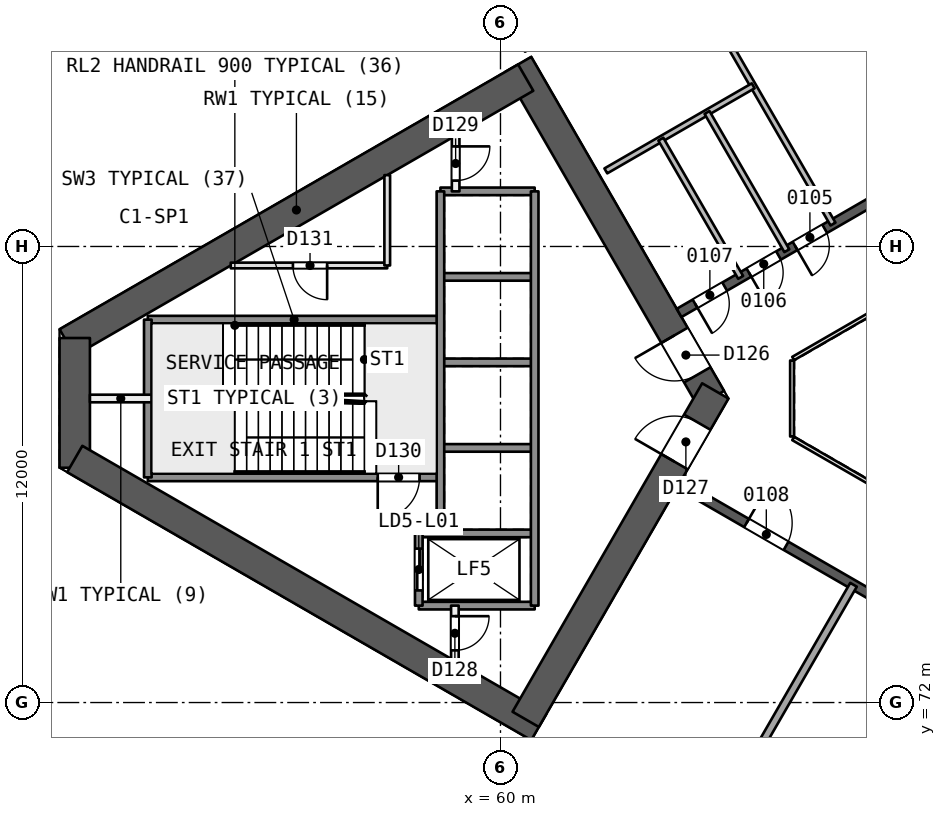
"""IFC4 building model, lengths in metres.
Left out: names, types, materials, properties, quantities, classifications, styles, units other than length and angle.
Written with IfcOpenShell. Run it as: python <this file> out.ifc"""

import sys

from ifc_helpers import new_model, si_unit, direction, frame, frame_2d, origin, place, context, subcontext, project, spatial, rectangle, extrude, element, fill, save


model = new_model("IFC4")
c1 = context("Model", 3, precision=1e-05, world=origin(), true_north=direction((0.0, 1.0)))
c2 = subcontext(c1, "Body", "Model", "MODEL_VIEW")
j1 = project(units=[si_unit("LENGTHUNIT", "METRE"), si_unit("PLANEANGLEUNIT", "RADIAN")], contexts=[c1])
p1 = place(None, origin())
s1 = spatial("IfcSite", under=j1, at=p1, CompositionType="ELEMENT")
p2 = place(p1, origin())
s2 = spatial("IfcBuilding", under=s1, at=p2, CompositionType="ELEMENT")
p3 = place(p2, frame((0.0, 0.0, 9.0)))
s3 = spatial("IfcBuildingStorey", under=s2, at=p3, CompositionType="ELEMENT", Elevation=9.0)
p4 = place(p3, frame((65.538, 80.0, 0.0), z_axis=(0.0, 0.0, 1.0), x_axis=(-0.49999662545, 0.866027352073, 0.0)))
e1 = element("IfcWall", 1, at=p4, inside=s3, PredefinedType="SHEAR", context=c2, shape_type="SweptSolid", body=[
    extrude(rectangle(XDim=10.149, YDim=0.8, at=frame_2d((5.074, 0.0))), origin(), (0.0, 0.0, 1.0), 6.0),
])
p5 = place(p4, frame((0.719, 0.0, 0.0)))
e2 = element("IfcOpeningElement", 2, at=p5, cuts=e1, PredefinedType="OPENING", context=c2, shape_type="SweptSolid", body=[
    extrude(rectangle(XDim=1.2, YDim=2.1, at=frame_2d((0.6, 1.05))), frame((0.0, 0.411, 0.0), z_axis=(0.0, -1.0, 0.0), x_axis=(1.0, 0.0, 0.0)), (0.0, 0.0, 1.0), 0.821),
])
p6 = place(p3, frame((60.664, 88.443, 0.0), z_axis=(0.0, 0.0, 1.0), x_axis=(-0.866029478545, -0.499992942241, 0.0)))
e3 = element("IfcWall", 3, at=p6, inside=s3, PredefinedType="SHEAR", context=c2, shape_type="SweptSolid", body=[
    extrude(rectangle(XDim=13.933, YDim=0.8, at=frame_2d((6.967, 0.0))), origin(), (0.0, 0.0, 1.0), 6.0),
])
p7 = place(p3, frame((48.797, 81.592, 0.0), z_axis=(0.0, 0.0, 1.0), x_axis=(0.0, -1.0, 0.0)))
e4 = element("IfcWall", 4, at=p7, inside=s3, PredefinedType="SHEAR", context=c2, shape_type="SweptSolid", body=[
    extrude(rectangle(XDim=3.415, YDim=0.8, at=frame_2d((1.707, 0.0))), origin(), (0.0, 0.0, 1.0), 6.0),
])
p8 = place(p3, frame((48.797, 78.408, 0.0), z_axis=(0.0, 0.0, 1.0), x_axis=(0.866032504327, -0.499987701298, 0.0)))
e5 = element("IfcWall", 5, at=p8, inside=s3, PredefinedType="SHEAR", context=c2, shape_type="SweptSolid", body=[
    extrude(rectangle(XDim=14.102, YDim=0.8, at=frame_2d((7.051, 0.0))), origin(), (0.0, 0.0, 1.0), 6.0),
])
p9 = place(p3, frame((60.664, 71.557, 0.0), z_axis=(0.0, 0.0, 1.0), x_axis=(0.50000409368, 0.866023040284, 0.0)))
e6 = element("IfcWall", 6, at=p9, inside=s3, PredefinedType="SHEAR", context=c2, shape_type="SweptSolid", body=[
    extrude(rectangle(XDim=9.98, YDim=0.8, at=frame_2d((4.99, 0.0))), origin(), (0.0, 0.0, 1.0), 6.0),
])
p10 = place(p9, frame((7.83, 0.0, 0.0)))
e7 = element("IfcOpeningElement", 7, at=p10, cuts=e6, PredefinedType="OPENING", context=c2, shape_type="SweptSolid", body=[
    extrude(rectangle(XDim=1.2, YDim=2.1, at=frame_2d((0.6, 1.05))), frame((0.0, 0.411, 0.0), z_axis=(0.0, -1.0, 0.0), x_axis=(1.0, 0.0, 0.0)), (0.0, 0.0, 1.0), 0.821),
])
p11 = place(p3, frame((78.2, 90.046, 0.0), z_axis=(0.0, 0.0, 1.0), x_axis=(-0.866026492143, -0.499998114903, 0.0)))
e8 = element("IfcWall", 8, at=p11, inside=s3, PredefinedType="SHEAR", context=c2, shape_type="SweptSolid", body=[
    extrude(rectangle(XDim=15.588, YDim=0.25, at=frame_2d((7.794, 0.0))), origin(), (0.0, 0.0, 1.0), 5.6),
])
p12 = place(p11, frame((4.856, 0.0, 0.0)))
e9 = element("IfcOpeningElement", 9, at=p12, cuts=e8, PredefinedType="OPENING", context=c2, shape_type="SweptSolid", body=[
    extrude(rectangle(XDim=1.2, YDim=2.4, at=frame_2d((0.6, 1.2))), frame((0.0, 0.135, 0.0), z_axis=(0.0, -1.0, 0.0), x_axis=(1.0, 0.0, 0.0)), (0.0, 0.0, 1.0), 0.271),
])
p13 = place(p11, frame((11.163, 0.0, 0.0)))
e10 = element("IfcOpeningElement", 10, at=p13, cuts=e8, PredefinedType="OPENING", context=c2, shape_type="SweptSolid", body=[
    extrude(rectangle(XDim=0.9, YDim=2.1, at=frame_2d((0.45, 1.05))), frame((0.0, 0.135, 0.0), z_axis=(0.0, -1.0, 0.0), x_axis=(1.0, 0.0, 0.0)), (0.0, 0.0, 1.0), 0.271),
])
p14 = place(p11, frame((12.566, 0.0, 0.0)))
e11 = element("IfcOpeningElement", 11, at=p14, cuts=e8, PredefinedType="OPENING", context=c2, shape_type="SweptSolid", body=[
    extrude(rectangle(XDim=0.9, YDim=2.1, at=frame_2d((0.45, 1.05))), frame((0.0, 0.135, 0.0), z_axis=(0.0, -1.0, 0.0), x_axis=(1.0, 0.0, 0.0)), (0.0, 0.0, 1.0), 0.271),
])
p15 = place(p11, frame((14.203, 0.0, 0.0)))
e12 = element("IfcOpeningElement", 12, at=p15, cuts=e8, PredefinedType="OPENING", context=c2, shape_type="SweptSolid", body=[
    extrude(rectangle(XDim=0.9, YDim=2.1, at=frame_2d((0.45, 1.05))), frame((0.0, 0.135, 0.0), z_axis=(0.0, -1.0, 0.0), x_axis=(1.0, 0.0, 0.0)), (0.0, 0.0, 1.0), 0.271),
])
p16 = place(p3, frame((64.7, 77.748, 0.0), z_axis=(0.0, 0.0, 1.0), x_axis=(0.866026492143, -0.499998114903, 0.0)))
e13 = element("IfcWall", 13, at=p16, inside=s3, PredefinedType="SHEAR", context=c2, shape_type="SweptSolid", body=[
    extrude(rectangle(XDim=15.588, YDim=0.25, at=frame_2d((7.794, 0.0))), origin(), (0.0, 0.0, 1.0), 5.6),
])
p17 = place(p16, frame((2.05, 0.0, 0.0)))
e14 = element("IfcOpeningElement", 14, at=p17, cuts=e13, PredefinedType="OPENING", context=c2, shape_type="SweptSolid", body=[
    extrude(rectangle(XDim=1.2, YDim=2.4, at=frame_2d((0.6, 1.2))), frame((0.0, 0.135, 0.0), z_axis=(0.0, -1.0, 0.0), x_axis=(1.0, 0.0, 0.0)), (0.0, 0.0, 1.0), 0.271),
])
p18 = place(p16, frame((7.272, 0.0, 0.0)))
e15 = element("IfcOpeningElement", 15, at=p18, cuts=e13, PredefinedType="OPENING", context=c2, shape_type="SweptSolid", body=[
    extrude(rectangle(XDim=1.2, YDim=2.4, at=frame_2d((0.6, 1.2))), frame((0.0, 0.135, 0.0), z_axis=(0.0, -1.0, 0.0), x_axis=(1.0, 0.0, 0.0)), (0.0, 0.0, 1.0), 0.271),
])
p19 = place(p16, frame((12.417, 0.0, 0.0)))
e16 = element("IfcOpeningElement", 16, at=p19, cuts=e13, PredefinedType="OPENING", context=c2, shape_type="SweptSolid", body=[
    extrude(rectangle(XDim=1.2, YDim=2.4, at=frame_2d((0.6, 1.2))), frame((0.0, 0.135, 0.0), z_axis=(0.0, -1.0, 0.0), x_axis=(1.0, 0.0, 0.0)), (0.0, 0.0, 1.0), 0.271),
])
p20 = place(p3, frame((62.117, 96.081, 0.0), z_axis=(0.0, 0.0, 1.0), x_axis=(0.49992899291, -0.866066395866, 0.0)))
e17 = element("IfcWall", 17, at=p20, inside=s3, PredefinedType="PARTITIONING", context=c2, shape_type="SweptSolid", body=[
    extrude(rectangle(XDim=13.268, YDim=0.15, at=frame_2d((6.634, 0.0))), origin(), (0.0, 0.0, 1.0), 5.6),
])
p21 = place(p20, frame((6.184, 0.0, 0.0)))
e18 = element("IfcOpeningElement", 18, at=p21, cuts=e17, PredefinedType="OPENING", context=c2, shape_type="SweptSolid", body=[
    extrude(rectangle(XDim=0.9, YDim=2.1, at=frame_2d((0.45, 1.05))), frame((0.0, 0.085, 0.0), z_axis=(0.0, -1.0, 0.0), x_axis=(1.0, 0.0, 0.0)), (0.0, 0.0, 1.0), 0.171),
])
p22 = place(p3, frame((62.772, 85.989, 0.0), z_axis=(0.0, 0.0, 1.0), x_axis=(0.866013054227, 0.500021389451, 0.0)))
e19 = element("IfcWall", 19, at=p22, inside=s3, PredefinedType="PARTITIONING", context=c2, shape_type="SweptSolid", body=[
    extrude(rectangle(XDim=4.477, YDim=0.15, at=frame_2d((2.239, 0.0))), origin(), (0.0, 0.0, 1.0), 5.6),
])
for number, where, z_axis, x_axis in (
    (20, (65.435, 87.526, 0.0), (0.0, 0.0, 1.0), (0.5, -0.866, 0.0)),
    (21, (64.22, 86.824, 0.0), (0.0, 0.0, 1.0), (0.5, -0.866, 0.0)),
):
    element("IfcWall", number, at=place(p3, frame(where, z_axis=z_axis, x_axis=x_axis)), inside=s3, PredefinedType="PARTITIONING", context=c2, shape_type="SweptSolid", body=[
        extrude(rectangle(XDim=4.2, YDim=0.15, at=frame_2d((2.1, 0.0))), origin(), (0.0, 0.0, 1.0), 5.6),
    ])
p23 = place(p3, frame((58.617, 56.612, 0.0), z_axis=(0.0, 0.0, 1.0), x_axis=(0.500000322675, 0.866025217488, 0.0)))
e22 = element("IfcWall", 22, at=p23, inside=s3, PredefinedType="PARTITIONING", context=c2, shape_type="SweptSolid", body=[
    extrude(rectangle(XDim=21.346, YDim=0.2, at=frame_2d((10.673, 0.0))), origin(), (0.0, 0.0, 1.0), 5.6),
])
p24 = place(p3, frame((63.072, 54.04, 0.0), z_axis=(0.0, 0.0, 1.0), x_axis=(0.500005275173, 0.86602235814, 0.0)))
e23 = element("IfcWall", 23, at=p24, inside=s3, PredefinedType="PARTITIONING", context=c2, shape_type="SweptSolid", body=[
    extrude(rectangle(XDim=21.346, YDim=0.2, at=frame_2d((10.673, 0.0))), origin(), (0.0, 0.0, 1.0), 5.6),
])
p25 = place(p3, frame((60.9, 85.45, 0.0), z_axis=(0.0, 0.0, 1.0), x_axis=(-1.0, 0.0, 0.0)))
e24 = element("IfcWall", 24, at=p25, inside=s3, PredefinedType="SOLIDWALL", context=c2, shape_type="SweptSolid", body=[
    extrude(rectangle(XDim=2.48, YDim=0.2, at=frame_2d((1.24, 0.0))), origin(), (0.0, 0.0, 1.0), 5.6),
])
p26 = place(p3, frame((57.02, 83.5, 0.0), z_axis=(0.0, 0.0, 1.0), x_axis=(-1.0, 0.0, 0.0)))
e25 = element("IfcWall", 25, at=p26, inside=s3, PredefinedType="PARTITIONING", context=c2, shape_type="SweptSolid", body=[
    extrude(rectangle(XDim=4.118, YDim=0.15, at=frame_2d((2.059, 0.0))), origin(), (0.0, 0.0, 1.0), 5.6),
])
p27 = place(p26, frame((1.582, 0.0, 0.0)))
e26 = element("IfcOpeningElement", 26, at=p27, cuts=e25, PredefinedType="OPENING", context=c2, shape_type="SweptSolid", body=[
    extrude(rectangle(XDim=0.9, YDim=2.1, at=frame_2d((0.45, 1.05))), frame((0.0, 0.085, 0.0), z_axis=(0.0, -1.0, 0.0), x_axis=(1.0, 0.0, 0.0)), (0.0, 0.0, 1.0), 0.171),
])
p28 = place(p3, frame((60.9, 83.2, 0.0), z_axis=(0.0, 0.0, 1.0), x_axis=(-1.0, 0.0, 0.0)))
e27 = element("IfcWall", 27, at=p28, inside=s3, PredefinedType="SOLIDWALL", context=c2, shape_type="SweptSolid", body=[
    extrude(rectangle(XDim=2.48, YDim=0.2, at=frame_2d((1.24, 0.0))), origin(), (0.0, 0.0, 1.0), 5.6),
])
p29 = place(p3, frame((58.42, 82.075, 0.0), z_axis=(0.0, 0.0, 1.0), x_axis=(-1.0, 0.0, 0.0)))
e28 = element("IfcWall", 28, at=p29, inside=s3, PredefinedType="SOLIDWALL", context=c2, shape_type="SweptSolid", body=[
    extrude(rectangle(XDim=7.7, YDim=0.2, at=frame_2d((3.85, 0.0))), origin(), (0.0, 0.0, 1.0), 5.6),
])
p30 = place(p3, frame((60.9, 80.95, 0.0), z_axis=(0.0, 0.0, 1.0), x_axis=(-1.0, 0.0, 0.0)))
e29 = element("IfcWall", 29, at=p30, inside=s3, PredefinedType="SOLIDWALL", context=c2, shape_type="SweptSolid", body=[
    extrude(rectangle(XDim=2.48, YDim=0.2, at=frame_2d((1.24, 0.0))), origin(), (0.0, 0.0, 1.0), 5.6),
])
p31 = place(p3, frame((50.82, 80.0, 0.0), z_axis=(0.0, 0.0, 1.0), x_axis=(-1.0, 0.0, 0.0)))
e30 = element("IfcWall", 30, at=p31, inside=s3, PredefinedType="PARTITIONING", context=c2, shape_type="SweptSolid", body=[
    extrude(rectangle(XDim=1.623, YDim=0.2, at=frame_2d((0.812, 0.0))), origin(), (0.0, 0.0, 1.0), 5.6),
])
p32 = place(p3, frame((60.9, 78.7, 0.0), z_axis=(0.0, 0.0, 1.0), x_axis=(-1.0, 0.0, 0.0)))
e31 = element("IfcWall", 31, at=p32, inside=s3, PredefinedType="SOLIDWALL", context=c2, shape_type="SweptSolid", body=[
    extrude(rectangle(XDim=2.48, YDim=0.2, at=frame_2d((1.24, 0.0))), origin(), (0.0, 0.0, 1.0), 5.6),
])
p33 = place(p3, frame((58.42, 77.925, 0.0), z_axis=(0.0, 0.0, 1.0), x_axis=(-1.0, 0.0, 0.0)))
e32 = element("IfcWall", 32, at=p33, inside=s3, PredefinedType="SOLIDWALL", context=c2, shape_type="SweptSolid", body=[
    extrude(rectangle(XDim=7.7, YDim=0.2, at=frame_2d((3.85, 0.0))), origin(), (0.0, 0.0, 1.0), 5.6),
])
p34 = place(p33, frame((0.55, 0.0, 0.0)))
e33 = element("IfcOpeningElement", 33, at=p34, cuts=e32, PredefinedType="OPENING", context=c2, shape_type="SweptSolid", body=[
    extrude(rectangle(XDim=1.1, YDim=2.1, at=frame_2d((0.55, 1.05))), frame((0.0, 0.11, 0.0), z_axis=(0.0, -1.0, 0.0), x_axis=(1.0, 0.0, 0.0)), (0.0, 0.0, 1.0), 0.221),
])
for number, where, z_axis, x_axis in (
    (34, (60.9, 76.45, 0.0), (0.0, 0.0, 1.0), (-1.0, 0.0, 0.0)),
    (35, (60.9, 74.55, 0.0), (0.0, 0.0, 1.0), (-1.0, 0.0, 0.0)),
):
    element("IfcWall", number, at=place(p3, frame(where, z_axis=z_axis, x_axis=x_axis)), inside=s3, PredefinedType="SOLIDWALL", context=c2, shape_type="SweptSolid", body=[
        extrude(rectangle(XDim=3.05, YDim=0.2, at=frame_2d((1.525, 0.0))), origin(), (0.0, 0.0, 1.0), 5.6),
    ])
p35 = place(p3, frame((60.9, 85.45, 0.0), z_axis=(0.0, 0.0, 1.0), x_axis=(0.0, -1.0, 0.0)))
e36 = element("IfcWall", 36, at=p35, inside=s3, PredefinedType="SOLIDWALL", context=c2, shape_type="SweptSolid", body=[
    extrude(rectangle(XDim=10.9, YDim=0.2, at=frame_2d((5.45, 0.0))), origin(), (0.0, 0.0, 1.0), 5.6),
])
p36 = place(p3, frame((58.82, 86.917, 0.0), z_axis=(0.0, 0.0, 1.0), x_axis=(0.0, -1.0, 0.0)))
e37 = element("IfcWall", 37, at=p36, inside=s3, PredefinedType="PARTITIONING", context=c2, shape_type="SweptSolid", body=[
    extrude(rectangle(XDim=1.467, YDim=0.2, at=frame_2d((0.733, 0.0))), origin(), (0.0, 0.0, 1.0), 5.6),
])
p37 = place(p36, frame((0.283, 0.0, 0.0)))
e38 = element("IfcOpeningElement", 38, at=p37, cuts=e37, PredefinedType="OPENING", context=c2, shape_type="SweptSolid", body=[
    extrude(rectangle(XDim=0.9, YDim=2.1, at=frame_2d((0.45, 1.05))), frame((0.0, 0.11, 0.0), z_axis=(0.0, -1.0, 0.0), x_axis=(1.0, 0.0, 0.0)), (0.0, 0.0, 1.0), 0.221),
])
p38 = place(p3, frame((58.8, 74.55, 0.0), z_axis=(0.0, 0.0, 1.0), x_axis=(0.0, -1.0, 0.0)))
e39 = element("IfcWall", 39, at=p38, inside=s3, PredefinedType="PARTITIONING", context=c2, shape_type="SweptSolid", body=[
    extrude(rectangle(XDim=1.455, YDim=0.2, at=frame_2d((0.728, 0.0))), origin(), (0.0, 0.0, 1.0), 5.6),
])
p39 = place(p38, frame((0.278, 0.0, 0.0)))
e40 = element("IfcOpeningElement", 40, at=p39, cuts=e39, PredefinedType="OPENING", context=c2, shape_type="SweptSolid", body=[
    extrude(rectangle(XDim=0.9, YDim=2.1, at=frame_2d((0.45, 1.05))), frame((0.0, 0.11, 0.0), z_axis=(0.0, -1.0, 0.0), x_axis=(1.0, 0.0, 0.0)), (0.0, 0.0, 1.0), 0.221),
])
p40 = place(p3, frame((58.42, 85.45, 0.0), z_axis=(0.0, 0.0, 1.0), x_axis=(0.0, -1.0, 0.0)))
e41 = element("IfcWall", 41, at=p40, inside=s3, PredefinedType="SOLIDWALL", context=c2, shape_type="SweptSolid", body=[
    extrude(rectangle(XDim=9.0, YDim=0.2, at=frame_2d((4.5, 0.0))), origin(), (0.0, 0.0, 1.0), 5.6),
])
p41 = place(p3, frame((57.85, 76.45, 0.0), z_axis=(0.0, 0.0, 1.0), x_axis=(0.0, -1.0, 0.0)))
e42 = element("IfcWall", 42, at=p41, inside=s3, PredefinedType="SOLIDWALL", context=c2, shape_type="SweptSolid", body=[
    extrude(rectangle(XDim=1.9, YDim=0.2, at=frame_2d((0.95, 0.0))), origin(), (0.0, 0.0, 1.0), 5.6),
])
p42 = place(p41, frame((0.4, 0.0, 0.0)))
e43 = element("IfcOpeningElement", 43, at=p42, cuts=e42, PredefinedType="OPENING", context=c2, shape_type="SweptSolid", body=[
    extrude(rectangle(XDim=1.1, YDim=2.1, at=frame_2d((0.55, 1.05))), frame((0.0, 0.11, 0.0), z_axis=(0.0, -1.0, 0.0), x_axis=(1.0, 0.0, 0.0)), (0.0, 0.0, 1.0), 0.221),
])
p43 = place(p3, frame((57.02, 85.877, 0.0), z_axis=(0.0, 0.0, 1.0), x_axis=(0.0, -1.0, 0.0)))
e44 = element("IfcWall", 44, at=p43, inside=s3, PredefinedType="PARTITIONING", context=c2, shape_type="SweptSolid", body=[
    extrude(rectangle(XDim=2.377, YDim=0.15, at=frame_2d((1.189, 0.0))), origin(), (0.0, 0.0, 1.0), 5.6),
])
p44 = place(p3, frame((50.72, 82.075, 0.0), z_axis=(0.0, 0.0, 1.0), x_axis=(0.0, -1.0, 0.0)))
e45 = element("IfcWall", 45, at=p44, inside=s3, PredefinedType="SOLIDWALL", context=c2, shape_type="SweptSolid", body=[
    extrude(rectangle(XDim=4.15, YDim=0.2, at=frame_2d((2.075, 0.0))), origin(), (0.0, 0.0, 1.0), 5.6),
])
p45 = place(p3, frame((77.738, 86.846, 0.0), z_axis=(0.0, 0.0, 1.0), x_axis=(-0.866026658274, -0.499997827154, 0.0)))
e46 = element("IfcWall", 46, at=p45, inside=s3, PredefinedType="PARTITIONING", context=c2, shape_type="SweptSolid", body=[
    extrude(rectangle(XDim=11.588, YDim=0.1, at=frame_2d((5.794, 0.0))), origin(), (0.0, 0.0, 1.0), 5.6),
])
p46 = place(p3, frame((67.672, 81.0, 0.0), z_axis=(0.0, 0.0, 1.0), x_axis=(0.0, -1.0, 0.0)))
e47 = element("IfcWall", 47, at=p46, inside=s3, PredefinedType="PARTITIONING", context=c2, shape_type="SweptSolid", body=[
    extrude(rectangle(XDim=2.0, YDim=0.1, at=frame_2d((1.0, 0.0))), origin(), (0.0, 0.0, 1.0), 5.6),
])
p47 = place(p3, frame((67.702, 78.948, 0.0), z_axis=(0.0, 0.0, 1.0), x_axis=(0.866026658274, -0.499997827154, 0.0)))
e48 = element("IfcWall", 48, at=p47, inside=s3, PredefinedType="PARTITIONING", context=c2, shape_type="SweptSolid", body=[
    extrude(rectangle(XDim=11.588, YDim=0.1, at=frame_2d((5.794, 0.0))), origin(), (0.0, 0.0, 1.0), 5.6),
])
p48 = place(p13, origin())
e49 = element("IfcDoor", 49, at=p48, inside=s3, OperationType="SINGLE_SWING_RIGHT", PredefinedType="NOTDEFINED", context=c2, shape_type="SweptSolid", body=[
    extrude(rectangle(XDim=0.9, YDim=2.1, at=frame_2d((0.45, 1.05))), frame((0.0, 0.025, 0.0), z_axis=(0.0, -1.0, 0.0), x_axis=(1.0, 0.0, 0.0)), (0.0, 0.0, 1.0), 0.05),
])
fill(e10, e49)
p49 = place(p14, origin())
e50 = element("IfcDoor", 50, at=p49, inside=s3, OperationType="SINGLE_SWING_RIGHT", PredefinedType="NOTDEFINED", context=c2, shape_type="SweptSolid", body=[
    extrude(rectangle(XDim=0.9, YDim=2.1, at=frame_2d((0.45, 1.05))), frame((0.0, 0.025, 0.0), z_axis=(0.0, -1.0, 0.0), x_axis=(1.0, 0.0, 0.0)), (0.0, 0.0, 1.0), 0.05),
])
fill(e11, e50)
p50 = place(p15, origin())
e51 = element("IfcDoor", 51, at=p50, inside=s3, OperationType="SINGLE_SWING_RIGHT", PredefinedType="NOTDEFINED", context=c2, shape_type="SweptSolid", body=[
    extrude(rectangle(XDim=0.9, YDim=2.1, at=frame_2d((0.45, 1.05))), frame((0.0, 0.025, 0.0), z_axis=(0.0, -1.0, 0.0), x_axis=(1.0, 0.0, 0.0)), (0.0, 0.0, 1.0), 0.05),
])
fill(e12, e51)
p51 = place(p17, origin())
e52 = element("IfcDoor", 52, at=p51, inside=s3, OperationType="SINGLE_SWING_LEFT", PredefinedType="NOTDEFINED", context=c2, shape_type="SweptSolid", body=[
    extrude(rectangle(XDim=1.2, YDim=2.4, at=frame_2d((0.6, 1.2))), frame((0.0, 0.025, 0.0), z_axis=(0.0, -1.0, 0.0), x_axis=(1.0, 0.0, 0.0)), (0.0, 0.0, 1.0), 0.05),
])
fill(e14, e52)
p52 = place(p5, origin())
e53 = element("IfcDoor", 53, at=p52, inside=s3, OperationType="SINGLE_SWING_RIGHT", PredefinedType="NOTDEFINED", context=c2, shape_type="SweptSolid", body=[
    extrude(rectangle(XDim=1.2, YDim=2.1, at=frame_2d((0.6, 1.05))), frame((0.0, 0.025, 0.0), z_axis=(0.0, -1.0, 0.0), x_axis=(1.0, 0.0, 0.0)), (0.0, 0.0, 1.0), 0.05),
])
fill(e2, e53)
p53 = place(p10, origin())
e54 = element("IfcDoor", 54, at=p53, inside=s3, OperationType="SINGLE_SWING_LEFT", PredefinedType="NOTDEFINED", context=c2, shape_type="SweptSolid", body=[
    extrude(rectangle(XDim=1.2, YDim=2.1, at=frame_2d((0.6, 1.05))), frame((0.0, 0.025, 0.0), z_axis=(0.0, -1.0, 0.0), x_axis=(1.0, 0.0, 0.0)), (0.0, 0.0, 1.0), 0.05),
])
fill(e7, e54)
p54 = place(p42, origin())
e55 = element("IfcDoor", 55, at=p54, inside=s3, OperationType="SLIDING_TO_RIGHT", PredefinedType="NOTDEFINED", context=c2, shape_type="SweptSolid", body=[
    extrude(rectangle(XDim=1.1, YDim=2.1, at=frame_2d((0.55, 1.05))), frame((0.0, 0.025, 0.0), z_axis=(0.0, -1.0, 0.0), x_axis=(1.0, 0.0, 0.0)), (0.0, 0.0, 1.0), 0.05),
])
fill(e43, e55)
p55 = place(p39, origin())
e56 = element("IfcDoor", 56, at=p55, inside=s3, OperationType="SINGLE_SWING_LEFT", PredefinedType="NOTDEFINED", context=c2, shape_type="SweptSolid", body=[
    extrude(rectangle(XDim=0.9, YDim=2.1, at=frame_2d((0.45, 1.05))), frame((0.0, 0.025, 0.0), z_axis=(0.0, -1.0, 0.0), x_axis=(1.0, 0.0, 0.0)), (0.0, 0.0, 1.0), 0.05),
])
fill(e40, e56)
p56 = place(p37, origin())
e57 = element("IfcDoor", 57, at=p56, inside=s3, OperationType="SINGLE_SWING_LEFT", PredefinedType="NOTDEFINED", context=c2, shape_type="SweptSolid", body=[
    extrude(rectangle(XDim=0.9, YDim=2.1, at=frame_2d((0.45, 1.05))), frame((0.0, 0.025, 0.0), z_axis=(0.0, -1.0, 0.0), x_axis=(1.0, 0.0, 0.0)), (0.0, 0.0, 1.0), 0.05),
])
fill(e38, e57)
p57 = place(p34, origin())
e58 = element("IfcDoor", 58, at=p57, inside=s3, OperationType="SINGLE_SWING_RIGHT", PredefinedType="NOTDEFINED", context=c2, shape_type="SweptSolid", body=[
    extrude(rectangle(XDim=1.1, YDim=2.1, at=frame_2d((0.55, 1.05))), frame((0.0, 0.025, 0.0), z_axis=(0.0, -1.0, 0.0), x_axis=(1.0, 0.0, 0.0)), (0.0, 0.0, 1.0), 0.05),
])
fill(e33, e58)
p58 = place(p27, origin())
e59 = element("IfcDoor", 59, at=p58, inside=s3, OperationType="SINGLE_SWING_LEFT", PredefinedType="NOTDEFINED", context=c2, shape_type="SweptSolid", body=[
    extrude(rectangle(XDim=0.9, YDim=2.1, at=frame_2d((0.45, 1.05))), frame((0.0, 0.025, 0.0), z_axis=(0.0, -1.0, 0.0), x_axis=(1.0, 0.0, 0.0)), (0.0, 0.0, 1.0), 0.05),
])
fill(e26, e59)
save(model, sys.argv[1])
